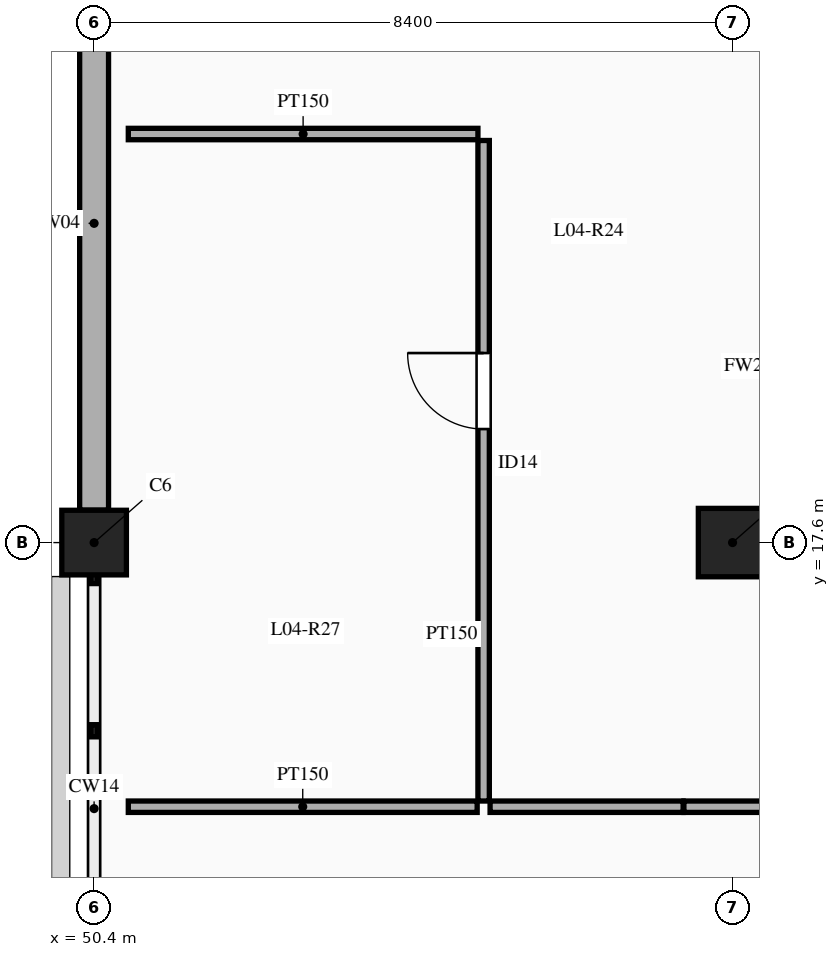
"""IFC4 building model, lengths in metres.
Left out: names, types, materials, properties, quantities, classifications, styles, units other than length and angle.
Written with IfcOpenShell. Run it as: python <this file> out.ifc"""

import sys

from ifc_helpers import new_model, si_unit, direction, frame, frame_2d, origin, origin_2d, place, context, subcontext, project, spatial, rectangle, extrude, element, fill, save


model = new_model("IFC4")
c1 = context("Model", 3, precision=1e-05, world=origin(), true_north=direction((0.0, 1.0)))
c2 = subcontext(c1, "Body", "Model", "MODEL_VIEW")
j1 = project(units=[si_unit("LENGTHUNIT", "METRE"), si_unit("PLANEANGLEUNIT", "RADIAN")], contexts=[c1])
p1 = place(None, origin())
s1 = spatial("IfcSite", under=j1, at=p1, CompositionType="ELEMENT")
p2 = place(p1, origin())
s2 = spatial("IfcBuilding", under=s1, at=p2, CompositionType="ELEMENT")
p3 = place(p2, frame((0.0, 0.0, 19.5)))
s3 = spatial("IfcBuildingStorey", under=s2, at=p3, CompositionType="ELEMENT", Elevation=19.5)
p4 = place(p3, frame((50.4, 17.6, 0.0), z_axis=(0.0, 0.0, 1.0), x_axis=(1.0, 0.0, 0.0)))
e1 = element("IfcColumn", 1, at=p4, inside=s3, PredefinedType="COLUMN", context=c2, shape_type="SweptSolid", body=[
    extrude(rectangle(XDim=0.85, YDim=0.85, at=origin_2d()), origin(), (0.0, 0.0, 1.0), 4.5),
])
p5 = place(p3, frame((58.8, 17.6, 0.0), z_axis=(0.0, 0.0, 1.0), x_axis=(1.0, 0.0, 0.0)))
e2 = element("IfcColumn", 2, at=p5, inside=s3, PredefinedType="COLUMN", context=c2, shape_type="SweptSolid", body=[
    extrude(rectangle(XDim=0.9, YDim=0.9, at=origin_2d()), origin(), (0.0, 0.0, 1.0), 4.5),
])
p6 = place(p3, frame((50.4, 18.027, 0.0), z_axis=(0.0, 0.0, 1.0), x_axis=(0.0, 1.0, 0.0)))
e3 = element("IfcWall", 3, at=p6, inside=s3, PredefinedType="SOLIDWALL", context=c2, shape_type="SweptSolid", body=[
    extrude(rectangle(XDim=7.546, YDim=0.38, at=frame_2d((3.773, 0.0))), origin(), (0.0, 0.0, 1.0), 3.55),
])
p7 = place(p3, frame((50.85, 22.975, 0.0), z_axis=(0.0, 0.0, 1.0), x_axis=(1.0, 0.0, 0.0)))
e4 = element("IfcWall", 4, at=p7, inside=s3, PredefinedType="PARTITIONING", context=c2, shape_type="SweptSolid", body=[
    extrude(rectangle(XDim=4.6, YDim=0.15, at=frame_2d((2.3, 0.0))), origin(), (0.0, 0.0, 1.0), 3.45),
])
p8 = place(p3, frame((55.525, 14.2, 0.0), z_axis=(0.0, 0.0, 1.0), x_axis=(0.0, 1.0, 0.0)))
e5 = element("IfcWall", 5, at=p8, inside=s3, PredefinedType="PARTITIONING", context=c2, shape_type="SweptSolid", body=[
    extrude(rectangle(XDim=8.69, YDim=0.15, at=frame_2d((4.345, 0.0))), origin(), (0.0, 0.0, 1.0), 3.45),
])
p9 = place(p8, frame((4.894, 0.0, 0.0)))
e6 = element("IfcOpeningElement", 6, at=p9, cuts=e5, PredefinedType="OPENING", context=c2, shape_type="SweptSolid", body=[
    extrude(rectangle(XDim=1.0, YDim=2.15, at=frame_2d((0.5, 1.075))), frame((0.0, 0.085, 0.0), z_axis=(0.0, -1.0, 0.0), x_axis=(1.0, 0.0, 0.0)), (0.0, 0.0, 1.0), 0.17),
])
p10 = place(p3, frame((55.61, 14.125, 0.0), z_axis=(0.0, 0.0, 1.0), x_axis=(1.0, 0.0, 0.0)))
e7 = element("IfcWall", 7, at=p10, inside=s3, PredefinedType="PARTITIONING", context=c2, shape_type="SweptSolid", body=[
    extrude(rectangle(XDim=2.54, YDim=0.15, at=frame_2d((1.27, 0.0))), origin(), (0.0, 0.0, 1.0), 3.45),
])
p11 = place(p3, frame((58.16, 14.125, 0.0), z_axis=(0.0, 0.0, 1.0), x_axis=(1.0, 0.0, 0.0)))
e8 = element("IfcWall", 8, at=p11, inside=s3, PredefinedType="PARTITIONING", context=c2, shape_type="SweptSolid", body=[
    extrude(rectangle(XDim=6.84, YDim=0.15, at=frame_2d((3.42, 0.0))), origin(), (0.0, 0.0, 1.0), 3.45),
])
p12 = place(p11, frame((2.92, 0.0, 0.0)))
e9 = element("IfcOpeningElement", 9, at=p12, cuts=e8, PredefinedType="OPENING", context=c2, shape_type="SweptSolid", body=[
    extrude(rectangle(XDim=1.0, YDim=2.15, at=frame_2d((0.5, 1.075))), frame((0.0, 0.085, 0.0), z_axis=(0.0, -1.0, 0.0), x_axis=(1.0, 0.0, 0.0)), (0.0, 0.0, 1.0), 0.17),
])
p13 = place(p3, frame((50.85, 14.125, 0.0), z_axis=(0.0, 0.0, 1.0), x_axis=(1.0, 0.0, 0.0)))
e10 = element("IfcWall", 10, at=p13, inside=s3, PredefinedType="PARTITIONING", context=c2, shape_type="SweptSolid", body=[
    extrude(rectangle(XDim=4.59, YDim=0.15, at=frame_2d((2.295, 0.0))), origin(), (0.0, 0.0, 1.0), 3.45),
])
p14 = place(p9, origin())
e11 = element("IfcDoor", 11, at=p14, inside=s3, OperationType="SINGLE_SWING_RIGHT", PredefinedType="DOOR", context=c2, shape_type="SweptSolid", body=[
    extrude(rectangle(XDim=1.0, YDim=2.15, at=frame_2d((0.5, 1.075))), frame((0.0, 0.025, 0.0), z_axis=(0.0, -1.0, 0.0), x_axis=(1.0, 0.0, 0.0)), (0.0, 0.0, 1.0), 0.05),
])
fill(e6, e11)
save(model, sys.argv[1])
